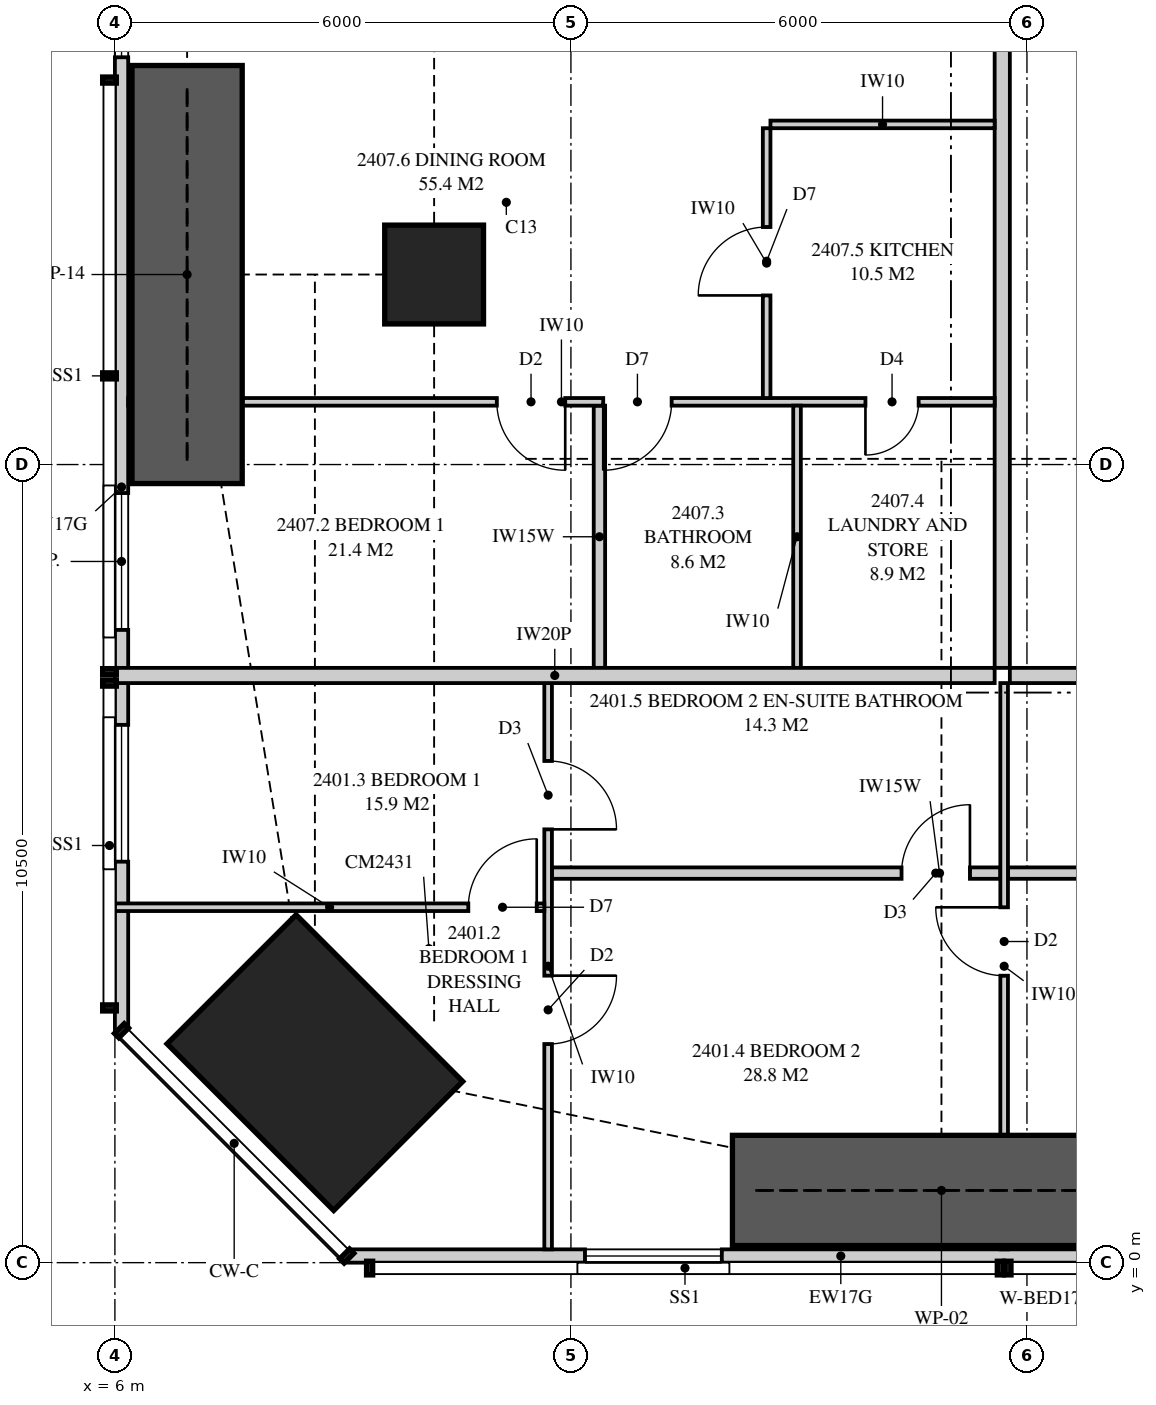
"""IFC4 building model, lengths in metres.
Left out: names, types, materials, properties, quantities, classifications, styles, units other than length and angle.
Written with IfcOpenShell. Run it as: python <this file> out.ifc"""

import sys

from ifc_helpers import new_model, si_unit, direction, frame, frame_2d, origin, origin_2d, place, context, subcontext, project, spatial, polyline, rectangle, outline, extrude, element, fill, save


model = new_model("IFC4")
c1 = context("Model", 3, precision=1e-05, world=origin(), true_north=direction((0.0, 1.0)))
c2 = subcontext(c1, "Body", "Model", "MODEL_VIEW")
j1 = project(units=[si_unit("LENGTHUNIT", "METRE"), si_unit("PLANEANGLEUNIT", "RADIAN")], contexts=[c1])
p1 = place(None, origin())
s1 = spatial("IfcSite", under=j1, at=p1, CompositionType="ELEMENT")
p2 = place(p1, origin())
s2 = spatial("IfcBuilding", under=s1, at=p2, CompositionType="ELEMENT")
p3 = place(p2, frame((0.0, 0.0, 91.45)))
s3 = spatial("IfcBuildingStorey", under=s2, at=p3, CompositionType="ELEMENT", Elevation=91.45)
p4 = place(p3, frame((8.631, 2.631, 0.0), z_axis=(0.0, 0.0, 1.0), x_axis=(0.707106781187, 0.707106781187, 0.0)))
e1 = element("IfcColumn", 1, at=p4, inside=s3, PredefinedType="COLUMN", context=c2, shape_type="SweptSolid", body=[
    extrude(rectangle(XDim=2.4, YDim=3.1, at=origin_2d()), origin(), (0.0, 0.0, 1.0), 3.35),
])
p5 = place(p3, frame((10.2, 13.0, 0.0), z_axis=(0.0, 0.0, 1.0), x_axis=(1.0, 0.0, 0.0)))
e2 = element("IfcColumn", 2, at=p5, inside=s3, PredefinedType="COLUMN", context=c2, shape_type="SweptSolid", body=[
    extrude(rectangle(XDim=1.3, YDim=1.3, at=origin_2d()), origin(), (0.0, 0.0, 1.0), 3.35),
])
p6 = place(p3, frame((9.051, 0.087, 0.0), z_axis=(0.0, 0.0, 1.0), x_axis=(1.0, 0.0, 0.0)))
e3 = element("IfcWall", 3, at=p6, inside=s3, PredefinedType="SOLIDWALL", context=c2, shape_type="SweptSolid", body=[
    extrude(outline(polyline([(0.0, 0.0), (12.999, 0.0), (12.999, 2.15), (7.824, 2.15), (7.824, 3.11), (7.666, 3.11), (7.666, 2.15), (7.62, 2.15), (7.62, 3.11), (0.0, 3.11), (0.0, 0.0)])), frame((0.0, 0.087, 0.0), z_axis=(0.0, -1.0, 0.0), x_axis=(1.0, 0.0, 0.0)), (0.0, 0.0, 1.0), 0.175),
])
p7 = place(p6, frame((3.134, 0.0, 0.4)))
e4 = element("IfcOpeningElement", 4, at=p7, cuts=e3, PredefinedType="OPENING", context=c2, shape_type="SweptSolid", body=[
    extrude(rectangle(XDim=1.8, YDim=1.7, at=frame_2d((0.9, 0.85))), frame((0.0, 0.097, 0.0), z_axis=(0.0, -1.0, 0.0), x_axis=(1.0, 0.0, 0.0)), (0.0, 0.0, 1.0), 0.195),
])
p8 = place(p6, frame((10.706, 0.0, 0.4)))
e5 = element("IfcOpeningElement", 5, at=p8, cuts=e3, PredefinedType="OPENING", context=c2, shape_type="SweptSolid", body=[
    extrude(rectangle(XDim=1.8, YDim=1.7, at=frame_2d((0.9, 0.85))), frame((0.0, 0.097, 0.0), z_axis=(0.0, -1.0, 0.0), x_axis=(1.0, 0.0, 0.0)), (0.0, 0.0, 1.0), 0.195),
])
p9 = place(p3, frame((6.087, 17.358, 0.0), z_axis=(0.0, 0.0, 1.0), x_axis=(0.0, -1.0, 0.0)))
e6 = element("IfcWall", 6, at=p9, inside=s3, PredefinedType="SOLIDWALL", context=c2, shape_type="SweptSolid", body=[
    extrude(outline(polyline([(0.0, 0.0), (14.307, 0.0), (14.307, 3.11), (4.577, 3.11), (4.577, 2.15), (4.484, 2.15), (4.484, 3.11), (4.358, 3.11), (4.358, 2.15), (0.0, 2.15), (0.0, 0.0)])), frame((0.0, 0.087, 0.0), z_axis=(0.0, -1.0, 0.0), x_axis=(1.0, 0.0, 0.0)), (0.0, 0.0, 1.0), 0.175),
])
p10 = place(p9, frame((0.3, 0.0, 0.4)))
e7 = element("IfcOpeningElement", 7, at=p10, cuts=e6, PredefinedType="OPENING", context=c2, shape_type="SweptSolid", body=[
    extrude(rectangle(XDim=1.2, YDim=1.7, at=frame_2d((0.6, 0.85))), frame((0.0, 0.097, 0.0), z_axis=(0.0, -1.0, 0.0), x_axis=(1.0, 0.0, 0.0)), (0.0, 0.0, 1.0), 0.195),
])
p11 = place(p9, frame((7.233, 0.0, 0.4)))
e8 = element("IfcOpeningElement", 8, at=p11, cuts=e6, PredefinedType="OPENING", context=c2, shape_type="SweptSolid", body=[
    extrude(rectangle(XDim=1.8, YDim=1.7, at=frame_2d((0.9, 0.85))), frame((0.0, 0.097, 0.0), z_axis=(0.0, -1.0, 0.0), x_axis=(1.0, 0.0, 0.0)), (0.0, 0.0, 1.0), 0.195),
])
p12 = place(p9, frame((10.283, 0.0, 0.4)))
e9 = element("IfcOpeningElement", 9, at=p12, cuts=e6, PredefinedType="OPENING", context=c2, shape_type="SweptSolid", body=[
    extrude(rectangle(XDim=1.8, YDim=1.7, at=frame_2d((0.9, 0.85))), frame((0.0, 0.097, 0.0), z_axis=(0.0, -1.0, 0.0), x_axis=(1.0, 0.0, 0.0)), (0.0, 0.0, 1.0), 0.195),
])
p13 = place(p3, frame((17.775, 7.725, 0.0), z_axis=(0.0, 0.0, 1.0), x_axis=(1.0, 0.0, 0.0)))
e10 = element("IfcWall", 10, at=p13, inside=s3, PredefinedType="PARTITIONING", context=c2, shape_type="SweptSolid", body=[
    extrude(rectangle(XDim=4.325, YDim=0.2, at=frame_2d((2.163, 0.0))), origin(), (0.0, 0.0, 1.0), 3.11),
])
p14 = place(p3, frame((11.7, 0.175, 0.0), z_axis=(0.0, 0.0, 1.0), x_axis=(0.0, 1.0, 0.0)))
e11 = element("IfcWall", 11, at=p14, inside=s3, PredefinedType="PARTITIONING", context=c2, shape_type="SweptSolid", body=[
    extrude(outline(polyline([(0.0, 0.0), (7.45, 0.0), (7.45, 3.11), (2.708, 3.11), (2.708, 2.15), (0.953, 2.15), (0.953, 3.11), (0.0, 3.11), (0.0, 0.0)])), frame((0.0, 0.05, 0.0), z_axis=(0.0, -1.0, 0.0), x_axis=(1.0, 0.0, 0.0)), (0.0, 0.0, 1.0), 0.1),
])
p15 = place(p14, frame((2.701, 0.0, 0.0)))
e12 = element("IfcOpeningElement", 12, at=p15, cuts=e11, PredefinedType="OPENING", context=c2, shape_type="SweptSolid", body=[
    extrude(rectangle(XDim=0.9, YDim=2.1, at=frame_2d((0.45, 1.05))), frame((0.0, 0.06, 0.0), z_axis=(0.0, -1.0, 0.0), x_axis=(1.0, 0.0, 0.0)), (0.0, 0.0, 1.0), 0.12),
])
p16 = place(p14, frame((5.525, 0.0, 0.0)))
e13 = element("IfcOpeningElement", 13, at=p16, cuts=e11, PredefinedType="OPENING", context=c2, shape_type="SweptSolid", body=[
    extrude(rectangle(XDim=0.9, YDim=2.1, at=frame_2d((0.45, 1.05))), frame((0.0, 0.06, 0.0), z_axis=(0.0, -1.0, 0.0), x_axis=(1.0, 0.0, 0.0)), (0.0, 0.0, 1.0), 0.12),
])
p17 = place(p3, frame((17.7, 0.175, 0.0), z_axis=(0.0, 0.0, 1.0), x_axis=(0.0, 1.0, 0.0)))
e14 = element("IfcWall", 14, at=p17, inside=s3, PredefinedType="PARTITIONING", context=c2, shape_type="SweptSolid", body=[
    extrude(outline(polyline([(1.635, 2.15), (0.0, 2.15), (0.0, 0.0), (7.45, 0.0), (7.45, 3.11), (1.635, 3.11), (1.635, 2.15)]), holes=[polyline([(1.021, 0.116), (0.529, 0.116), (0.529, 0.906), (1.021, 0.906), (1.021, 0.116)]), polyline([(1.021, 1.244), (0.529, 1.244), (0.529, 2.034), (1.021, 2.034), (1.021, 1.244)])]), frame((0.0, 0.05, 0.0), z_axis=(0.0, -1.0, 0.0), x_axis=(1.0, 0.0, 0.0)), (0.0, 0.0, 1.0), 0.1),
])
p18 = place(p17, frame((3.6, 0.0, 0.0)))
e15 = element("IfcOpeningElement", 15, at=p18, cuts=e14, PredefinedType="OPENING", context=c2, shape_type="SweptSolid", body=[
    extrude(rectangle(XDim=0.9, YDim=2.1, at=frame_2d((0.45, 1.05))), frame((0.0, 0.06, 0.0), z_axis=(0.0, -1.0, 0.0), x_axis=(1.0, 0.0, 0.0)), (0.0, 0.0, 1.0), 0.12),
])
p19 = place(p3, frame((6.0, 4.676, 0.0), z_axis=(0.0, 0.0, 1.0), x_axis=(1.0, 0.0, 0.0)))
e16 = element("IfcWall", 16, at=p19, inside=s3, PredefinedType="PARTITIONING", context=c2, shape_type="SweptSolid", body=[
    extrude(outline(polyline([(0.0, 0.0), (5.65, 0.0), (5.65, 3.11), (5.46, 3.11), (5.46, 2.51), (3.171, 2.51), (3.171, 2.15), (1.429, 2.15), (1.429, 3.11), (0.0, 3.11), (0.0, 0.0)])), frame((0.0, 0.05, 0.0), z_axis=(0.0, -1.0, 0.0), x_axis=(1.0, 0.0, 0.0)), (0.0, 0.0, 1.0), 0.1),
])
p20 = place(p19, frame((4.65, 0.0, 0.0)))
e17 = element("IfcOpeningElement", 17, at=p20, cuts=e16, PredefinedType="OPENING", context=c2, shape_type="SweptSolid", body=[
    extrude(rectangle(XDim=0.9, YDim=2.1, at=frame_2d((0.45, 1.05))), frame((0.0, 0.06, 0.0), z_axis=(0.0, -1.0, 0.0), x_axis=(1.0, 0.0, 0.0)), (0.0, 0.0, 1.0), 0.12),
])
p21 = place(p3, frame((11.75, 5.125, 0.0), z_axis=(0.0, 0.0, 1.0), x_axis=(1.0, 0.0, 0.0)))
e18 = element("IfcWall", 18, at=p21, inside=s3, PredefinedType="PLUMBINGWALL", context=c2, shape_type="SweptSolid", body=[
    extrude(outline(polyline([(0.0, 0.0), (5.9, 0.0), (5.9, 3.11), (5.438, 3.11), (5.438, 2.541), (4.812, 2.541), (4.812, 3.11), (0.0, 3.11), (0.0, 0.0)])), frame((0.0, 0.075, 0.0), z_axis=(0.0, -1.0, 0.0), x_axis=(1.0, 0.0, 0.0)), (0.0, 0.0, 1.0), 0.15),
])
p22 = place(p21, frame((4.6, 0.0, 0.0)))
e19 = element("IfcOpeningElement", 19, at=p22, cuts=e18, PredefinedType="OPENING", context=c2, shape_type="SweptSolid", body=[
    extrude(rectangle(XDim=0.9, YDim=2.1, at=frame_2d((0.45, 1.05))), frame((0.0, 0.085, 0.0), z_axis=(0.0, -1.0, 0.0), x_axis=(1.0, 0.0, 0.0)), (0.0, 0.0, 1.0), 0.17),
])
p23 = place(p3, frame((17.75, 5.125, 0.0), z_axis=(0.0, 0.0, 1.0), x_axis=(1.0, 0.0, 0.0)))
e20 = element("IfcWall", 20, at=p23, inside=s3, PredefinedType="PLUMBINGWALL", context=c2, shape_type="SweptSolid", body=[
    extrude(rectangle(XDim=4.2, YDim=0.15, at=frame_2d((2.1, 0.0))), origin(), (0.0, 0.0, 1.0), 3.11),
])
p24 = place(p3, frame((6.0, 7.725, 0.0), z_axis=(0.0, 0.0, 1.0), x_axis=(1.0, 0.0, 0.0)))
e21 = element("IfcWall", 21, at=p24, inside=s3, PredefinedType="PARTITIONING", context=c2, shape_type="SweptSolid", body=[
    extrude(outline(polyline([(0.0, 0.0), (11.575, 0.0), (11.575, 3.11), (11.212, 3.11), (11.212, 2.541), (10.538, 2.541), (10.538, 3.11), (5.51, 3.11), (5.51, 2.51), (2.969, 2.51), (2.969, 2.541), (2.727, 2.541), (2.727, 2.15), (0.884, 2.15), (0.884, 3.11), (0.0, 3.11), (0.0, 0.0)])), frame((0.0, 0.1, 0.0), z_axis=(0.0, -1.0, 0.0), x_axis=(1.0, 0.0, 0.0)), (0.0, 0.0, 1.0), 0.2),
])
p25 = place(p3, frame((17.675, 7.825, 0.0), z_axis=(0.0, 0.0, 1.0), x_axis=(0.0, 1.0, 0.0)))
e22 = element("IfcWall", 22, at=p25, inside=s3, PredefinedType="PARTITIONING", context=c2, shape_type="SweptSolid", body=[
    extrude(outline(polyline([(0.0, 0.0), (9.075, 0.0), (9.075, 3.11), (3.087, 3.11), (3.087, 2.541), (2.413, 2.541), (2.413, 3.11), (0.0, 3.11), (0.0, 0.0)])), frame((0.0, 0.1, 0.0), z_axis=(0.0, -1.0, 0.0), x_axis=(1.0, 0.0, 0.0)), (0.0, 0.0, 1.0), 0.2),
])
p26 = place(p3, frame((6.175, 11.325, 0.0), z_axis=(0.0, 0.0, 1.0), x_axis=(1.0, 0.0, 0.0)))
e23 = element("IfcWall", 23, at=p26, inside=s3, PredefinedType="PARTITIONING", context=c2, shape_type="SweptSolid", body=[
    extrude(outline(polyline([(0.175, 3.11), (0.0, 3.11), (0.0, 0.0), (0.529, 0.0), (0.529, 0.325), (1.021, 0.325), (1.021, 0.0), (11.4, 0.0), (11.4, 3.11), (5.285, 3.11), (5.285, 2.51), (2.765, 2.51), (2.765, 3.11), (2.744, 3.11), (2.744, 2.541), (2.169, 2.541), (2.169, 3.11), (1.918, 3.11), (1.918, 2.15), (1.021, 2.15), (1.021, 1.825), (0.529, 1.825), (0.529, 2.15), (0.175, 2.15), (0.175, 3.11)])), frame((0.0, 0.05, 0.0), z_axis=(0.0, -1.0, 0.0), x_axis=(1.0, 0.0, 0.0)), (0.0, 0.0, 1.0), 0.1),
])
p27 = place(p26, frame((4.85, 0.0, 0.0)))
e24 = element("IfcOpeningElement", 24, at=p27, cuts=e23, PredefinedType="OPENING", context=c2, shape_type="SweptSolid", body=[
    extrude(rectangle(XDim=0.9, YDim=2.1, at=frame_2d((0.45, 1.05))), frame((0.0, 0.06, 0.0), z_axis=(0.0, -1.0, 0.0), x_axis=(1.0, 0.0, 0.0)), (0.0, 0.0, 1.0), 0.12),
])
p28 = place(p26, frame((6.25, 0.0, 0.0)))
e25 = element("IfcOpeningElement", 25, at=p28, cuts=e23, PredefinedType="OPENING", context=c2, shape_type="SweptSolid", body=[
    extrude(rectangle(XDim=0.9, YDim=2.1, at=frame_2d((0.45, 1.05))), frame((0.0, 0.06, 0.0), z_axis=(0.0, -1.0, 0.0), x_axis=(1.0, 0.0, 0.0)), (0.0, 0.0, 1.0), 0.12),
])
p29 = place(p26, frame((9.7, 0.0, 0.0)))
e26 = element("IfcOpeningElement", 26, at=p29, cuts=e23, PredefinedType="OPENING", context=c2, shape_type="SweptSolid", body=[
    extrude(rectangle(XDim=0.7, YDim=2.1, at=frame_2d((0.35, 1.05))), frame((0.0, 0.06, 0.0), z_axis=(0.0, -1.0, 0.0), x_axis=(1.0, 0.0, 0.0)), (0.0, 0.0, 1.0), 0.12),
])
p30 = place(p3, frame((12.375, 7.825, 0.0), z_axis=(0.0, 0.0, 1.0), x_axis=(0.0, 1.0, 0.0)))
e27 = element("IfcWall", 27, at=p30, inside=s3, PredefinedType="PLUMBINGWALL", context=c2, shape_type="SweptSolid", body=[
    extrude(outline(polyline([(0.0, 0.0), (3.45, 0.0), (3.45, 3.11), (3.062, 3.11), (3.062, 2.541), (2.438, 2.541), (2.438, 3.11), (0.0, 3.11), (0.0, 0.0)])), frame((0.0, 0.075, 0.0), z_axis=(0.0, -1.0, 0.0), x_axis=(1.0, 0.0, 0.0)), (0.0, 0.0, 1.0), 0.15),
])
p31 = place(p3, frame((14.975, 7.825, 0.0), z_axis=(0.0, 0.0, 1.0), x_axis=(0.0, 1.0, 0.0)))
e28 = element("IfcWall", 28, at=p31, inside=s3, PredefinedType="PARTITIONING", context=c2, shape_type="SweptSolid", body=[
    extrude(outline(polyline([(0.0, 0.0), (3.45, 0.0), (3.45, 3.11), (3.037, 3.11), (3.037, 2.541), (2.463, 2.541), (2.463, 3.11), (0.0, 3.11), (0.0, 0.0)])), frame((0.0, 0.05, 0.0), z_axis=(0.0, -1.0, 0.0), x_axis=(1.0, 0.0, 0.0)), (0.0, 0.0, 1.0), 0.1),
])
p32 = place(p3, frame((14.575, 11.375, 0.0), z_axis=(0.0, 0.0, 1.0), x_axis=(0.0, 1.0, 0.0)))
e29 = element("IfcWall", 29, at=p32, inside=s3, PredefinedType="PARTITIONING", context=c2, shape_type="SweptSolid", body=[
    extrude(rectangle(XDim=3.55, YDim=0.1, at=frame_2d((1.775, 0.0))), origin(), (0.0, 0.0, 1.0), 3.11),
])
p33 = place(p32, frame((1.35, 0.0, 0.0)))
e30 = element("IfcOpeningElement", 30, at=p33, cuts=e29, PredefinedType="OPENING", context=c2, shape_type="SweptSolid", body=[
    extrude(rectangle(XDim=0.9, YDim=2.1, at=frame_2d((0.45, 1.05))), frame((0.0, 0.06, 0.0), z_axis=(0.0, -1.0, 0.0), x_axis=(1.0, 0.0, 0.0)), (0.0, 0.0, 1.0), 0.12),
])
p34 = place(p3, frame((14.625, 14.975, 0.0), z_axis=(0.0, 0.0, 1.0), x_axis=(1.0, 0.0, 0.0)))
e31 = element("IfcWall", 31, at=p34, inside=s3, PredefinedType="PARTITIONING", context=c2, shape_type="SweptSolid", body=[
    extrude(rectangle(XDim=2.95, YDim=0.1, at=frame_2d((1.475, 0.0))), origin(), (0.0, 0.0, 1.0), 3.11),
])
for number, where, z_axis, x_axis in (
    (32, (14.125, 0.95, 0.0), (0.0, 0.0, 1.0), (1.0, 0.0, 0.0)),
    (33, (6.95, 10.25, 0.0), (0.0, 0.0, 1.0), (0.0, 1.0, 0.0)),
):
    element("IfcWall", number, at=place(p3, frame(where, z_axis=z_axis, x_axis=x_axis)), inside=s3, PredefinedType="SHEAR", context=c2, shape_type="SweptSolid", body=[
        extrude(rectangle(XDim=5.5, YDim=1.45, at=frame_2d((2.75, 0.0))), origin(), (0.0, 0.0, 1.0), 3.35),
    ])
p35 = place(p7, origin())
e34 = element("IfcWindow", 34, at=p35, inside=s3, PartitioningType="SINGLE_PANEL", PredefinedType="WINDOW", context=c2, shape_type="SweptSolid", body=[
    extrude(rectangle(XDim=1.8, YDim=1.7, at=frame_2d((0.9, 0.85))), frame((0.0, 0.03, 0.0), z_axis=(0.0, -1.0, 0.0), x_axis=(1.0, 0.0, 0.0)), (0.0, 0.0, 1.0), 0.06),
])
fill(e4, e34)
p36 = place(p10, origin())
e35 = element("IfcWindow", 35, at=p36, inside=s3, PartitioningType="SINGLE_PANEL", PredefinedType="WINDOW", context=c2, shape_type="SweptSolid", body=[
    extrude(rectangle(XDim=1.2, YDim=1.7, at=frame_2d((0.6, 0.85))), frame((0.0, 0.03, 0.0), z_axis=(0.0, -1.0, 0.0), x_axis=(1.0, 0.0, 0.0)), (0.0, 0.0, 1.0), 0.06),
])
fill(e7, e35)
p37 = place(p11, origin())
e36 = element("IfcWindow", 36, at=p37, inside=s3, PartitioningType="SINGLE_PANEL", PredefinedType="WINDOW", context=c2, shape_type="SweptSolid", body=[
    extrude(rectangle(XDim=1.8, YDim=1.7, at=frame_2d((0.9, 0.85))), frame((0.0, 0.03, 0.0), z_axis=(0.0, -1.0, 0.0), x_axis=(1.0, 0.0, 0.0)), (0.0, 0.0, 1.0), 0.06),
])
fill(e8, e36)
p38 = place(p12, origin())
e37 = element("IfcWindow", 37, at=p38, inside=s3, PartitioningType="SINGLE_PANEL", PredefinedType="WINDOW", context=c2, shape_type="SweptSolid", body=[
    extrude(rectangle(XDim=1.8, YDim=1.7, at=frame_2d((0.9, 0.85))), frame((0.0, 0.03, 0.0), z_axis=(0.0, -1.0, 0.0), x_axis=(1.0, 0.0, 0.0)), (0.0, 0.0, 1.0), 0.06),
])
fill(e9, e37)
p39 = place(p20, origin())
e38 = element("IfcDoor", 38, at=p39, inside=s3, OperationType="SINGLE_SWING_RIGHT", PredefinedType="DOOR", context=c2, shape_type="SweptSolid", body=[
    extrude(rectangle(XDim=0.9, YDim=2.1, at=frame_2d((0.45, 1.05))), frame((0.0, 0.025, 0.0), z_axis=(0.0, -1.0, 0.0), x_axis=(1.0, 0.0, 0.0)), (0.0, 0.0, 1.0), 0.05),
])
fill(e17, e38)
p40 = place(p15, frame((0.9, 0.0, 0.0), z_axis=(0.0, 0.0, 1.0), x_axis=(-1.0, 0.0, 0.0)))
e39 = element("IfcDoor", 39, at=p40, inside=s3, OperationType="SINGLE_SWING_LEFT", PredefinedType="DOOR", context=c2, shape_type="SweptSolid", body=[
    extrude(rectangle(XDim=0.9, YDim=2.1, at=frame_2d((0.45, 1.05))), frame((0.0, 0.025, 0.0), z_axis=(0.0, -1.0, 0.0), x_axis=(1.0, 0.0, 0.0)), (0.0, 0.0, 1.0), 0.05),
])
fill(e12, e39)
p41 = place(p18, origin())
e40 = element("IfcDoor", 40, at=p41, inside=s3, OperationType="SINGLE_SWING_RIGHT", PredefinedType="DOOR", context=c2, shape_type="SweptSolid", body=[
    extrude(rectangle(XDim=0.9, YDim=2.1, at=frame_2d((0.45, 1.05))), frame((0.0, 0.025, 0.0), z_axis=(0.0, -1.0, 0.0), x_axis=(1.0, 0.0, 0.0)), (0.0, 0.0, 1.0), 0.05),
])
fill(e15, e40)
p42 = place(p22, origin())
e41 = element("IfcDoor", 41, at=p42, inside=s3, OperationType="SINGLE_SWING_RIGHT", PredefinedType="DOOR", context=c2, shape_type="SweptSolid", body=[
    extrude(rectangle(XDim=0.9, YDim=2.1, at=frame_2d((0.45, 1.05))), frame((0.0, 0.025, 0.0), z_axis=(0.0, -1.0, 0.0), x_axis=(1.0, 0.0, 0.0)), (0.0, 0.0, 1.0), 0.05),
])
fill(e19, e41)
p43 = place(p16, frame((0.9, 0.0, 0.0), z_axis=(0.0, 0.0, 1.0), x_axis=(-1.0, 0.0, 0.0)))
e42 = element("IfcDoor", 42, at=p43, inside=s3, OperationType="SINGLE_SWING_RIGHT", PredefinedType="DOOR", context=c2, shape_type="SweptSolid", body=[
    extrude(rectangle(XDim=0.9, YDim=2.1, at=frame_2d((0.45, 1.05))), frame((0.0, 0.025, 0.0), z_axis=(0.0, -1.0, 0.0), x_axis=(1.0, 0.0, 0.0)), (0.0, 0.0, 1.0), 0.05),
])
fill(e13, e42)
p44 = place(p27, frame((0.9, 0.0, 0.0), z_axis=(0.0, 0.0, 1.0), x_axis=(-1.0, 0.0, 0.0)))
e43 = element("IfcDoor", 43, at=p44, inside=s3, OperationType="SINGLE_SWING_LEFT", PredefinedType="DOOR", context=c2, shape_type="SweptSolid", body=[
    extrude(rectangle(XDim=0.9, YDim=2.1, at=frame_2d((0.45, 1.05))), frame((0.0, 0.025, 0.0), z_axis=(0.0, -1.0, 0.0), x_axis=(1.0, 0.0, 0.0)), (0.0, 0.0, 1.0), 0.05),
])
fill(e24, e43)
p45 = place(p28, frame((0.9, 0.0, 0.0), z_axis=(0.0, 0.0, 1.0), x_axis=(-1.0, 0.0, 0.0)))
e44 = element("IfcDoor", 44, at=p45, inside=s3, OperationType="SINGLE_SWING_RIGHT", PredefinedType="DOOR", context=c2, shape_type="SweptSolid", body=[
    extrude(rectangle(XDim=0.9, YDim=2.1, at=frame_2d((0.45, 1.05))), frame((0.0, 0.025, 0.0), z_axis=(0.0, -1.0, 0.0), x_axis=(1.0, 0.0, 0.0)), (0.0, 0.0, 1.0), 0.05),
])
fill(e25, e44)
p46 = place(p29, frame((0.7, 0.0, 0.0), z_axis=(0.0, 0.0, 1.0), x_axis=(-1.0, 0.0, 0.0)))
e45 = element("IfcDoor", 45, at=p46, inside=s3, OperationType="SINGLE_SWING_RIGHT", PredefinedType="DOOR", context=c2, shape_type="SweptSolid", body=[
    extrude(rectangle(XDim=0.7, YDim=2.1, at=frame_2d((0.35, 1.05))), frame((0.0, 0.025, 0.0), z_axis=(0.0, -1.0, 0.0), x_axis=(1.0, 0.0, 0.0)), (0.0, 0.0, 1.0), 0.05),
])
fill(e26, e45)
p47 = place(p33, origin())
e46 = element("IfcDoor", 46, at=p47, inside=s3, OperationType="SINGLE_SWING_LEFT", PredefinedType="DOOR", context=c2, shape_type="SweptSolid", body=[
    extrude(rectangle(XDim=0.9, YDim=2.1, at=frame_2d((0.45, 1.05))), frame((0.0, 0.025, 0.0), z_axis=(0.0, -1.0, 0.0), x_axis=(1.0, 0.0, 0.0)), (0.0, 0.0, 1.0), 0.05),
])
fill(e30, e46)
save(model, sys.argv[1])
